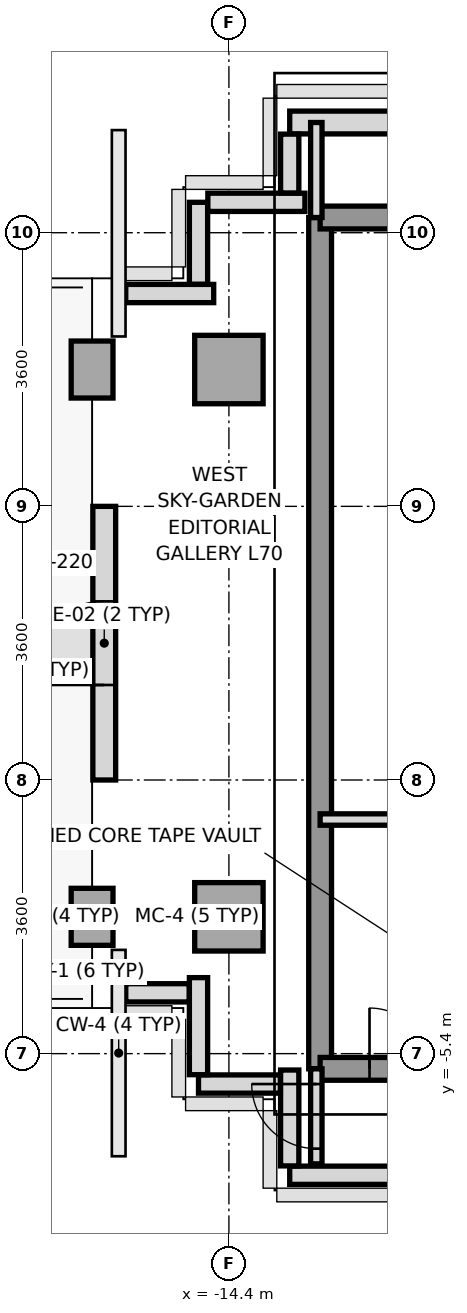
"""IFC4 building model, lengths in metres.
Left out: names, types, materials, properties, quantities, classifications, styles, units other than length and angle.
Written with IfcOpenShell. Run it as: python <this file> out.ifc"""

import sys

from ifc_helpers import new_model, si_unit, direction, frame, frame_2d, origin, origin_2d, place, context, subcontext, project, spatial, rectangle, extrude, source, transform, mapped, element, fill, save


model = new_model("IFC4")
c1 = context("Model", 3, precision=1e-05, world=origin(), true_north=direction((0.0, 1.0)))
c2 = subcontext(c1, "Body", "Model", "MODEL_VIEW")
j1 = project(units=[si_unit("LENGTHUNIT", "METRE"), si_unit("PLANEANGLEUNIT", "RADIAN")], contexts=[c1])
p1 = place(None, origin())
s1 = spatial("IfcSite", under=j1, at=p1, CompositionType="ELEMENT")
p2 = place(p1, origin())
s2 = spatial("IfcBuilding", under=s1, at=p2, CompositionType="ELEMENT")
p3 = place(p2, frame((0.0, 0.0, 252.4)))
s3 = spatial("IfcBuildingStorey", under=s2, at=p3, CompositionType="ELEMENT", Elevation=252.4)
m1 = source(origin(), c2, "Body", "SweptSolid", [
    extrude(rectangle(XDim=0.55, YDim=0.75, at=origin_2d()), origin(), (0.0, 0.0, 1.0), 3.01),
])
for number, where, z_axis, x_axis in (
    (1, (-16.2, -3.6, 0.0), (0.0, 0.0, 1.0), (1.0, 0.0, 0.0)),
    (2, (-16.2, 3.6, 0.0), (0.0, 0.0, 1.0), (1.0, 0.0, 0.0)),
):
    element("IfcColumn", number, at=place(p3, frame(where, z_axis=z_axis, x_axis=x_axis)), inside=s3, PredefinedType="COLUMN", context=c2, shape_type="MappedRepresentation", body=[
        mapped(m1, transform((0.0, 0.0, 0.0), x_axis=(1.0, 0.0, 0.0), y_axis=(0.0, 1.0, 0.0), z_axis=(0.0, 0.0, 1.0), scale=1.0)),
    ])
m2 = source(origin(), c2, "Body", "SweptSolid", [
    extrude(rectangle(XDim=0.9, YDim=0.9, at=origin_2d()), origin(), (0.0, 0.0, 1.0), 3.01),
])
for number, where, z_axis, x_axis in (
    (3, (-14.4, -3.6, 0.0), (0.0, 0.0, 1.0), (1.0, 0.0, 0.0)),
    (4, (-14.4, 3.6, 0.0), (0.0, 0.0, 1.0), (1.0, 0.0, 0.0)),
):
    element("IfcColumn", number, at=place(p3, frame(where, z_axis=z_axis, x_axis=x_axis)), inside=s3, PredefinedType="COLUMN", context=c2, shape_type="MappedRepresentation", body=[
        mapped(m2, transform((0.0, 0.0, 0.0), x_axis=(1.0, 0.0, 0.0), y_axis=(0.0, 1.0, 0.0), z_axis=(0.0, 0.0, 1.0), scale=1.0)),
    ])
p4 = place(p3, frame((-13.6, 6.85, 0.0), z_axis=(0.0, 0.0, 1.0), x_axis=(1.0, 0.0, 0.0)))
e5 = element("IfcWall", 5, at=p4, inside=s3, PredefinedType="SOLIDWALL", context=c2, shape_type="SweptSolid", body=[
    extrude(rectangle(XDim=2.152, YDim=0.3, at=frame_2d((1.076, 0.0))), origin(), (0.0, 0.0, 1.0), 3.01),
])
p5 = place(p3, frame((-16.04, -1.8, 0.0), z_axis=(0.0, 0.0, 1.0), x_axis=(0.0, 1.0, 0.0)))
e6 = element("IfcWall", 6, at=p5, inside=s3, PredefinedType="SOLIDWALL", context=c2, shape_type="SweptSolid", body=[
    extrude(rectangle(XDim=3.6, YDim=0.3, at=frame_2d((1.8, 0.0))), origin(), (0.0, 0.0, 1.0), 2.36),
])
p6 = place(p5, frame((1.25, 0.0, 0.0)))
e7 = element("IfcOpeningElement", 7, at=p6, cuts=e6, PredefinedType="OPENING", context=c2, shape_type="SweptSolid", body=[
    extrude(rectangle(XDim=1.1, YDim=2.3, at=frame_2d((0.55, 1.15))), frame((0.0, 0.16, 0.0), z_axis=(0.0, -1.0, 0.0), x_axis=(1.0, 0.0, 0.0)), (0.0, 0.0, 1.0), 0.32),
])
p7 = place(p3, frame((-9.523, -7.0, 0.0), z_axis=(0.0, 0.0, 1.0), x_axis=(-1.0, 0.0, 0.0)))
e8 = element("IfcWall", 8, at=p7, inside=s3, PredefinedType="PARAPET", context=c2, shape_type="SweptSolid", body=[
    extrude(rectangle(XDim=4.077, YDim=0.24, at=frame_2d((2.039, 0.0))), origin(), (0.0, 0.0, 1.0), 1.15),
])
p8 = place(p3, frame((-13.6, -6.877, 0.0), z_axis=(0.0, 0.0, 1.0), x_axis=(0.0, 1.0, 0.0)))
e9 = element("IfcWall", 9, at=p8, inside=s3, PredefinedType="PARAPET", context=c2, shape_type="SweptSolid", body=[
    extrude(rectangle(XDim=1.261, YDim=0.24, at=frame_2d((0.631, 0.0))), origin(), (0.0, 0.0, 1.0), 1.15),
])
p9 = place(p3, frame((-13.723, -5.8, 0.0), z_axis=(0.0, 0.0, 1.0), x_axis=(-1.0, 0.0, 0.0)))
e10 = element("IfcWall", 10, at=p9, inside=s3, PredefinedType="PARAPET", context=c2, shape_type="SweptSolid", body=[
    extrude(rectangle(XDim=1.077, YDim=0.24, at=frame_2d((0.539, 0.0))), origin(), (0.0, 0.0, 1.0), 1.15),
])
p10 = place(p3, frame((-14.8, -5.677, 0.0), z_axis=(0.0, 0.0, 1.0), x_axis=(0.0, 1.0, 0.0)))
e11 = element("IfcWall", 11, at=p10, inside=s3, PredefinedType="PARAPET", context=c2, shape_type="SweptSolid", body=[
    extrude(rectangle(XDim=1.277, YDim=0.24, at=frame_2d((0.639, 0.0))), origin(), (0.0, 0.0, 1.0), 1.15),
])
p11 = place(p3, frame((-14.923, -4.6, 0.0), z_axis=(0.0, 0.0, 1.0), x_axis=(-1.0, 0.0, 0.0)))
e12 = element("IfcWall", 12, at=p11, inside=s3, PredefinedType="PARAPET", context=c2, shape_type="SweptSolid", body=[
    extrude(rectangle(XDim=0.834, YDim=0.24, at=frame_2d((0.417, 0.0))), origin(), (0.0, 0.0, 1.0), 1.15),
])
p12 = place(p3, frame((-15.757, 4.6, 0.0), z_axis=(0.0, 0.0, 1.0), x_axis=(1.0, 0.0, 0.0)))
e13 = element("IfcWall", 13, at=p12, inside=s3, PredefinedType="PARAPET", context=c2, shape_type="SweptSolid", body=[
    extrude(rectangle(XDim=1.157, YDim=0.24, at=frame_2d((0.579, 0.0))), origin(), (0.0, 0.0, 1.0), 1.15),
])
p13 = place(p3, frame((-14.8, 4.723, 0.0), z_axis=(0.0, 0.0, 1.0), x_axis=(0.0, 1.0, 0.0)))
e14 = element("IfcWall", 14, at=p13, inside=s3, PredefinedType="PARAPET", context=c2, shape_type="SweptSolid", body=[
    extrude(rectangle(XDim=1.077, YDim=0.24, at=frame_2d((0.539, 0.0))), origin(), (0.0, 0.0, 1.0), 1.15),
])
p14 = place(p3, frame((-14.677, 5.8, 0.0), z_axis=(0.0, 0.0, 1.0), x_axis=(1.0, 0.0, 0.0)))
e15 = element("IfcWall", 15, at=p14, inside=s3, PredefinedType="PARAPET", context=c2, shape_type="SweptSolid", body=[
    extrude(rectangle(XDim=1.277, YDim=0.24, at=frame_2d((0.639, 0.0))), origin(), (0.0, 0.0, 1.0), 1.15),
])
p15 = place(p3, frame((-13.6, 5.923, 0.0), z_axis=(0.0, 0.0, 1.0), x_axis=(0.0, 1.0, 0.0)))
e16 = element("IfcWall", 16, at=p15, inside=s3, PredefinedType="PARAPET", context=c2, shape_type="SweptSolid", body=[
    extrude(rectangle(XDim=0.774, YDim=0.24, at=frame_2d((0.387, 0.0))), origin(), (0.0, 0.0, 1.0), 1.15),
])
p16 = place(p3, frame((-13.2, -5.6, 0.0), z_axis=(0.0, 0.0, 1.0), x_axis=(0.0, 1.0, 0.0)))
e17 = element("IfcWall", 17, at=p16, inside=s3, PredefinedType="SHEAR", context=c2, shape_type="SweptSolid", body=[
    extrude(rectangle(XDim=11.2, YDim=0.3, at=frame_2d((5.6, 0.0))), origin(), (0.0, 0.0, 1.0), 3.01),
])
p17 = place(p3, frame((-13.2, 5.6, 0.0), z_axis=(0.0, 0.0, 1.0), x_axis=(1.0, 0.0, 0.0)))
e18 = element("IfcWall", 18, at=p17, inside=s3, PredefinedType="SHEAR", context=c2, shape_type="SweptSolid", body=[
    extrude(rectangle(XDim=1.844, YDim=0.3, at=frame_2d((0.922, 0.0))), origin(), (0.0, 0.0, 1.0), 3.01),
])
p18 = place(p3, frame((-13.2, -5.6, 0.0), z_axis=(0.0, 0.0, 1.0), x_axis=(1.0, 0.0, 0.0)))
e19 = element("IfcWall", 19, at=p18, inside=s3, PredefinedType="SHEAR", context=c2, shape_type="SweptSolid", body=[
    extrude(rectangle(XDim=7.8, YDim=0.3, at=frame_2d((3.9, 0.0))), origin(), (0.0, 0.0, 1.0), 3.01),
])
p19 = place(p18, frame((0.65, 0.0, 0.0)))
e20 = element("IfcOpeningElement", 20, at=p19, cuts=e19, PredefinedType="OPENING", context=c2, shape_type="SweptSolid", body=[
    extrude(rectangle(XDim=0.8, YDim=2.1, at=frame_2d((0.4, 1.05))), frame((0.0, 0.16, 0.0), z_axis=(0.0, -1.0, 0.0), x_axis=(1.0, 0.0, 0.0)), (0.0, 0.0, 1.0), 0.32),
])
p20 = place(p18, frame((3.4, 0.0, 0.0)))
e21 = element("IfcOpeningElement", 21, at=p20, cuts=e19, PredefinedType="OPENING", context=c2, shape_type="SweptSolid", body=[
    extrude(rectangle(XDim=0.95, YDim=2.15, at=frame_2d((0.475, 1.075))), frame((0.0, 0.16, 0.0), z_axis=(0.0, -1.0, 0.0), x_axis=(1.0, 0.0, 0.0)), (0.0, 0.0, 1.0), 0.32),
])
p21 = place(p18, frame((5.8, 0.0, 0.0)))
e22 = element("IfcOpeningElement", 22, at=p21, cuts=e19, PredefinedType="OPENING", context=c2, shape_type="SweptSolid", body=[
    extrude(rectangle(XDim=0.95, YDim=2.15, at=frame_2d((0.475, 1.075))), frame((0.0, 0.16, 0.0), z_axis=(0.0, -1.0, 0.0), x_axis=(1.0, 0.0, 0.0)), (0.0, 0.0, 1.0), 0.32),
])
p22 = place(p3, frame((-13.2, -2.32, 0.0), z_axis=(0.0, 0.0, 1.0), x_axis=(1.0, 0.0, 0.0)))
e23 = element("IfcWall", 23, at=p22, inside=s3, PredefinedType="PARTITIONING", context=c2, shape_type="SweptSolid", body=[
    extrude(rectangle(XDim=2.18, YDim=0.15, at=frame_2d((1.09, 0.0))), origin(), (0.0, 0.0, 1.0), 3.01),
])
p23 = place(p3, frame((-13.25, 5.6, 0.0), z_axis=(0.0, 0.0, 1.0), x_axis=(0.0, 1.0, 0.0)))
e24 = element("IfcWall", 24, at=p23, inside=s3, PredefinedType="PARTITIONING", context=c2, shape_type="SweptSolid", body=[
    extrude(rectangle(XDim=1.25, YDim=0.15, at=frame_2d((0.625, 0.0))), origin(), (0.0, 0.0, 1.0), 3.01),
])
p24 = place(p3, frame((-13.25, -6.85, 0.0), z_axis=(0.0, 0.0, 1.0), x_axis=(0.0, 1.0, 0.0)))
e25 = element("IfcWall", 25, at=p24, inside=s3, PredefinedType="PARTITIONING", context=c2, shape_type="SweptSolid", body=[
    extrude(rectangle(XDim=1.25, YDim=0.15, at=frame_2d((0.625, 0.0))), origin(), (0.0, 0.0, 1.0), 3.01),
])
p25 = place(p24, frame((0.2, 0.0, 0.0)))
e26 = element("IfcOpeningElement", 26, at=p25, cuts=e25, PredefinedType="OPENING", context=c2, shape_type="SweptSolid", body=[
    extrude(rectangle(XDim=0.85, YDim=2.1, at=frame_2d((0.425, 1.05))), frame((0.0, 0.085, 0.0), z_axis=(0.0, -1.0, 0.0), x_axis=(1.0, 0.0, 0.0)), (0.0, 0.0, 1.0), 0.17),
])
m3 = source(origin(), c2, "Body", "SweptSolid", [
    extrude(rectangle(XDim=1.1, YDim=2.3, at=frame_2d((0.55, 1.15))), frame((0.0, 0.025, 0.0), z_axis=(0.0, -1.0, 0.0), x_axis=(1.0, 0.0, 0.0)), (0.0, 0.0, 1.0), 0.05),
])
p26 = place(p6, origin())
e27 = element("IfcDoor", 27, at=p26, inside=s3, OperationType="SINGLE_SWING_LEFT", PredefinedType="DOOR", context=c2, shape_type="MappedRepresentation", body=[
    mapped(m3, transform((0.0, 0.0, 0.0), x_axis=(1.0, 0.0, 0.0), y_axis=(0.0, 1.0, 0.0), z_axis=(0.0, 0.0, 1.0), scale=1.0)),
])
fill(e7, e27)
m4 = source(origin(), c2, "Body", "SweptSolid", [
    extrude(rectangle(XDim=0.8, YDim=2.1, at=frame_2d((0.4, 1.05))), frame((0.0, 0.025, 0.0), z_axis=(0.0, -1.0, 0.0), x_axis=(1.0, 0.0, 0.0)), (0.0, 0.0, 1.0), 0.05),
])
p27 = place(p19, origin())
e28 = element("IfcDoor", 28, at=p27, inside=s3, OperationType="SINGLE_SWING_LEFT", PredefinedType="DOOR", context=c2, shape_type="MappedRepresentation", body=[
    mapped(m4, transform((0.0, 0.0, 0.0), x_axis=(1.0, 0.0, 0.0), y_axis=(0.0, 1.0, 0.0), z_axis=(0.0, 0.0, 1.0), scale=1.0)),
])
fill(e20, e28)
m5 = source(origin(), c2, "Body", "SweptSolid", [
    extrude(rectangle(XDim=0.85, YDim=2.1, at=frame_2d((0.425, 1.05))), frame((0.0, 0.025, 0.0), z_axis=(0.0, -1.0, 0.0), x_axis=(1.0, 0.0, 0.0)), (0.0, 0.0, 1.0), 0.05),
])
p28 = place(p25, origin())
e29 = element("IfcDoor", 29, at=p28, inside=s3, OperationType="SINGLE_SWING_RIGHT", PredefinedType="DOOR", context=c2, shape_type="MappedRepresentation", body=[
    mapped(m5, transform((0.0, 0.0, 0.0), x_axis=(1.0, 0.0, 0.0), y_axis=(0.0, 1.0, 0.0), z_axis=(0.0, 0.0, 1.0), scale=1.0)),
])
fill(e26, e29)
save(model, sys.argv[1])
